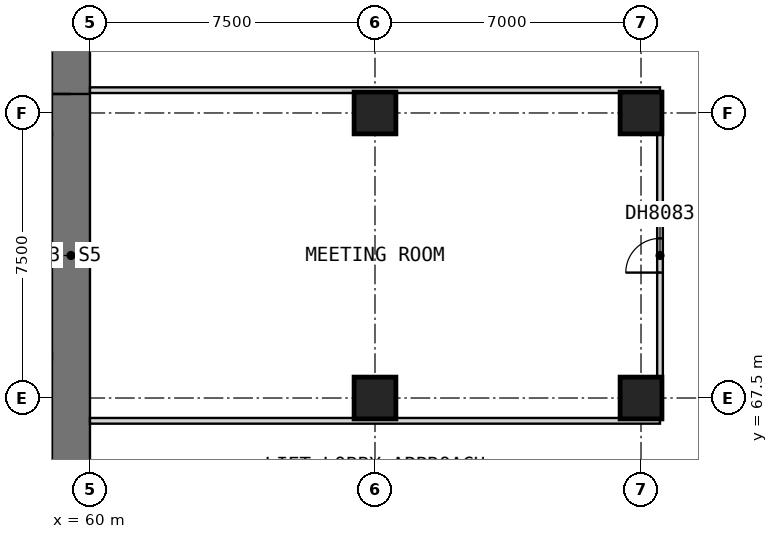
"""IFC4 building model, lengths in metres.
Left out: names, types, materials, properties, quantities, classifications, styles, units other than length and angle.
Written with IfcOpenShell. Run it as: python <this file> out.ifc"""

import sys

from ifc_helpers import new_model, si_unit, direction, frame, frame_2d, origin, origin_2d, place, context, subcontext, project, spatial, rectangle, extrude, element, fill, save


model = new_model("IFC4")
c1 = context("Model", 3, precision=1e-05, world=origin(), true_north=direction((0.0, 1.0)))
c2 = subcontext(c1, "Body", "Model", "MODEL_VIEW")
j1 = project(units=[si_unit("LENGTHUNIT", "METRE"), si_unit("PLANEANGLEUNIT", "RADIAN")], contexts=[c1])
p1 = place(None, origin())
s1 = spatial("IfcSite", under=j1, at=p1, CompositionType="ELEMENT")
p2 = place(p1, origin())
s2 = spatial("IfcBuilding", under=s1, at=p2, CompositionType="ELEMENT")
p3 = place(p2, frame((0.0, 0.0, 89.9)))
s3 = spatial("IfcBuildingStorey", under=s2, at=p3, CompositionType="ELEMENT", Elevation=89.9)
for number, where, z_axis, x_axis in (
    (1, (67.5, 67.5, 0.0), (0.0, 0.0, 1.0), (1.0, 0.0, 0.0)),
    (2, (67.5, 75.0, 0.0), (0.0, 0.0, 1.0), (1.0, 0.0, 0.0)),
    (3, (74.5, 67.5, 0.0), (0.0, 0.0, 1.0), (1.0, 0.0, 0.0)),
    (4, (74.5, 75.0, 0.0), (0.0, 0.0, 1.0), (1.0, 0.0, 0.0)),
):
    element("IfcColumn", number, at=place(p3, frame(where, z_axis=z_axis, x_axis=x_axis)), inside=s3, PredefinedType="COLUMN", context=c2, shape_type="SweptSolid", body=[
        extrude(rectangle(XDim=1.1, YDim=1.1, at=origin_2d()), origin(), (0.0, 0.0, 1.0), 3.6),
    ])
p4 = place(p3, frame((59.5, 61.0, 0.0), z_axis=(0.0, 0.0, 1.0), x_axis=(0.0, 1.0, 0.0)))
e5 = element("IfcWall", 5, at=p4, inside=s3, PredefinedType="SHEAR", context=c2, shape_type="SweptSolid", body=[
    extrude(rectangle(XDim=20.5, YDim=1.0, at=frame_2d((10.25, 0.0))), origin(), (0.0, 0.0, 1.0), 3.6),
])
p5 = place(p4, frame((14.5, 0.0, 0.0)))
e6 = element("IfcOpeningElement", 6, at=p5, cuts=e5, PredefinedType="OPENING", context=c2, shape_type="SweptSolid", body=[
    extrude(rectangle(XDim=1.8, YDim=2.1, at=frame_2d((0.9, 1.05))), frame((0.0, 0.51, 0.0), z_axis=(0.0, -1.0, 0.0), x_axis=(1.0, 0.0, 0.0)), (0.0, 0.0, 1.0), 1.02),
])
p6 = place(p3, frame((75.0, 66.975, 0.0), z_axis=(0.0, 0.0, 1.0), x_axis=(0.0, 1.0, 0.0)))
e7 = element("IfcWall", 7, at=p6, inside=s3, PredefinedType="PARTITIONING", context=c2, shape_type="SweptSolid", body=[
    extrude(rectangle(XDim=8.55, YDim=0.15, at=frame_2d((4.275, 0.0))), origin(), (0.0, 0.0, 1.0), 3.35),
])
p7 = place(p6, frame((3.825, 0.0, 0.0)))
e8 = element("IfcOpeningElement", 8, at=p7, cuts=e7, PredefinedType="OPENING", context=c2, shape_type="SweptSolid", body=[
    extrude(rectangle(XDim=0.9, YDim=2.1, at=frame_2d((0.45, 1.05))), frame((0.0, 0.085, 0.0), z_axis=(0.0, -1.0, 0.0), x_axis=(1.0, 0.0, 0.0)), (0.0, 0.0, 1.0), 0.17),
])
for number, where, z_axis, x_axis in (
    (9, (60.0, 66.9, 0.0), (0.0, 0.0, 1.0), (1.0, 0.0, 0.0)),
    (10, (60.0, 75.6, 0.0), (0.0, 0.0, 1.0), (1.0, 0.0, 0.0)),
):
    element("IfcWall", number, at=place(p3, frame(where, z_axis=z_axis, x_axis=x_axis)), inside=s3, PredefinedType="PARTITIONING", context=c2, shape_type="SweptSolid", body=[
        extrude(rectangle(XDim=15.0, YDim=0.15, at=frame_2d((7.5, 0.0))), origin(), (0.0, 0.0, 1.0), 3.35),
    ])
p8 = place(p5, origin())
e11 = element("IfcDoor", 11, at=p8, inside=s3, OperationType="DOUBLE_DOOR_SINGLE_SWING", PredefinedType="DOOR", context=c2, shape_type="SweptSolid", body=[
    extrude(rectangle(XDim=1.8, YDim=2.1, at=frame_2d((0.9, 1.05))), frame((0.0, 0.025, 0.0), z_axis=(0.0, -1.0, 0.0), x_axis=(1.0, 0.0, 0.0)), (0.0, 0.0, 1.0), 0.05),
])
fill(e6, e11)
p9 = place(p7, origin())
e12 = element("IfcDoor", 12, at=p9, inside=s3, OperationType="SINGLE_SWING_LEFT", PredefinedType="DOOR", context=c2, shape_type="SweptSolid", body=[
    extrude(rectangle(XDim=0.9, YDim=2.1, at=frame_2d((0.45, 1.05))), frame((0.0, 0.025, 0.0), z_axis=(0.0, -1.0, 0.0), x_axis=(1.0, 0.0, 0.0)), (0.0, 0.0, 1.0), 0.05),
])
fill(e8, e12)
save(model, sys.argv[1])
